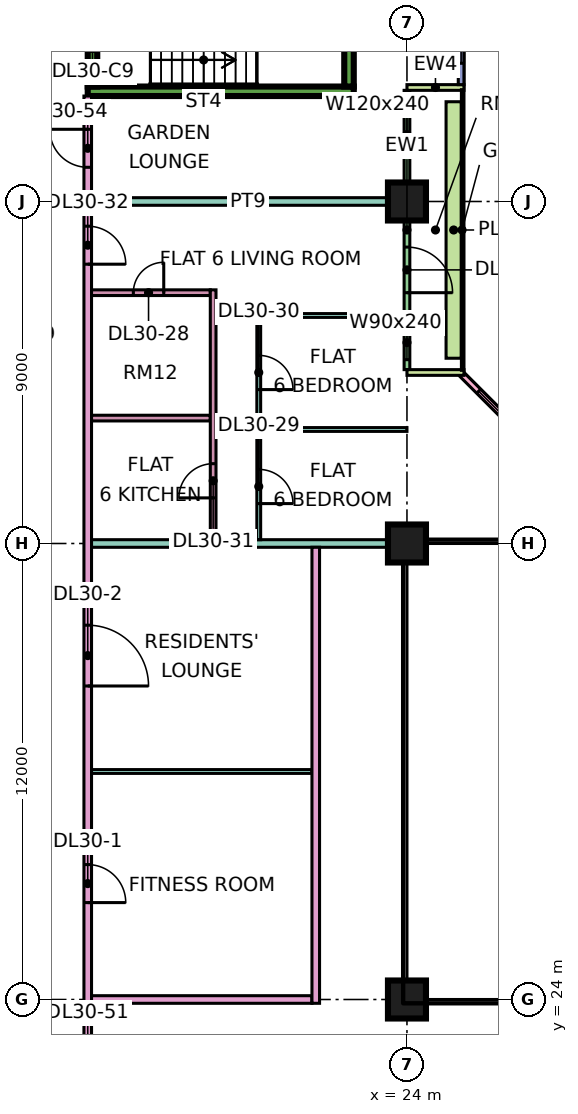
"""IFC4 building model, lengths in metres.
Left out: names, types, materials, properties, quantities, classifications, styles, units other than length and angle.
Written with IfcOpenShell. Run it as: python <this file> out.ifc"""

import sys

from ifc_helpers import new_model, si_unit, direction, frame, frame_2d, origin, origin_2d, place, context, subcontext, project, spatial, rectangle, extrude, element, fill, save


model = new_model("IFC4")
c1 = context("Model", 3, precision=1e-05, world=origin(), true_north=direction((0.0, 1.0)))
c2 = subcontext(c1, "Body", "Model", "MODEL_VIEW")
j1 = project(units=[si_unit("LENGTHUNIT", "METRE"), si_unit("PLANEANGLEUNIT", "RADIAN")], contexts=[c1])
p1 = place(None, origin())
s1 = spatial("IfcSite", under=j1, at=p1, CompositionType="ELEMENT")
p2 = place(p1, origin())
s2 = spatial("IfcBuilding", under=s1, at=p2, CompositionType="ELEMENT")
p3 = place(p2, frame((0.0, 0.0, 129.4)))
s3 = spatial("IfcBuildingStorey", under=s2, at=p3, CompositionType="ELEMENT", Elevation=129.4)
for number, where, z_axis, x_axis in (
    (1, (24.0, 24.0, 0.0), (0.0, 0.0, 1.0), (1.0, 0.0, 0.0)),
    (2, (24.0, 36.0, 0.0), (0.0, 0.0, 1.0), (1.0, 0.0, 0.0)),
    (3, (24.0, 45.0, 0.0), (0.0, 0.0, 1.0), (1.0, 0.0, 0.0)),
):
    element("IfcColumn", number, at=place(p3, frame(where, z_axis=z_axis, x_axis=x_axis)), inside=s3, PredefinedType="COLUMN", context=c2, shape_type="SweptSolid", body=[
        extrude(rectangle(XDim=1.0, YDim=1.0, at=origin_2d()), origin(), (0.0, 0.0, 1.0), 3.75),
    ])
p4 = place(p3, frame((15.6, 47.9, 0.0), z_axis=(0.0, 0.0, 1.0), x_axis=(1.0, 0.0, 0.0)))
e4 = element("IfcWall", 4, at=p4, inside=s3, PredefinedType="SHEAR", context=c2, shape_type="SweptSolid", body=[
    extrude(rectangle(XDim=7.0, YDim=0.25, at=frame_2d((3.5, 0.0))), origin(), (0.0, 0.0, 1.0), 3.75),
])
p5 = place(p3, frame((15.725, 48.025, 0.0), z_axis=(0.0, 0.0, 1.0), x_axis=(0.0, 1.0, 0.0)))
e5 = element("IfcWall", 5, at=p5, inside=s3, PredefinedType="SHEAR", context=c2, shape_type="SweptSolid", body=[
    extrude(rectangle(XDim=2.95, YDim=0.25, at=frame_2d((1.475, 0.0))), origin(), (0.0, 0.0, 1.0), 3.75),
])
p6 = place(p5, frame((0.925, 0.0, 0.0)))
e6 = element("IfcOpeningElement", 6, at=p6, cuts=e5, PredefinedType="OPENING", context=c2, shape_type="SweptSolid", body=[
    extrude(rectangle(XDim=1.1, YDim=2.2, at=frame_2d((0.55, 1.1))), frame((0.0, 0.135, 0.0), z_axis=(0.0, -1.0, 0.0), x_axis=(1.0, 0.0, 0.0)), (0.0, 0.0, 1.0), 0.27),
])
p7 = place(p3, frame((22.475, 48.025, 0.0), z_axis=(0.0, 0.0, 1.0), x_axis=(0.0, 1.0, 0.0)))
e7 = element("IfcWall", 7, at=p7, inside=s3, PredefinedType="SHEAR", context=c2, shape_type="SweptSolid", body=[
    extrude(rectangle(XDim=2.95, YDim=0.25, at=frame_2d((1.475, 0.0))), origin(), (0.0, 0.0, 1.0), 3.75),
])
p8 = place(p3, frame((28.447, 37.447, 0.0), z_axis=(0.0, 0.0, 1.0), x_axis=(-0.707106781187, 0.707106781187, 0.0)))
e8 = element("IfcWall", 8, at=p8, inside=s3, PredefinedType="SOLIDWALL", context=c2, shape_type="SweptSolid", body=[
    extrude(rectangle(XDim=4.243, YDim=0.15, at=frame_2d((2.121, 0.0))), origin(), (0.0, 0.0, 1.0), 3.35),
])
p9 = place(p8, frame((0.621, 0.0, 0.45)))
e9 = element("IfcOpeningElement", 9, at=p9, cuts=e8, PredefinedType="OPENING", context=c2, shape_type="SweptSolid", body=[
    extrude(rectangle(XDim=3.0, YDim=2.4, at=frame_2d((1.5, 1.2))), frame((0.0, 0.085, 0.0), z_axis=(0.0, -1.0, 0.0), x_axis=(1.0, 0.0, 0.0)), (0.0, 0.0, 1.0), 0.17),
])
p10 = place(p3, frame((24.0, 40.575, 0.0), z_axis=(0.0, 0.0, 1.0), x_axis=(0.0, 1.0, 0.0)))
e10 = element("IfcWall", 10, at=p10, inside=s3, PredefinedType="SOLIDWALL", context=c2, shape_type="SweptSolid", body=[
    extrude(rectangle(XDim=7.35, YDim=0.15, at=frame_2d((3.675, 0.0))), origin(), (0.0, 0.0, 1.0), 3.35),
])
p11 = place(p10, frame((0.262, 0.0, 0.45)))
e11 = element("IfcOpeningElement", 11, at=p11, cuts=e10, PredefinedType="OPENING", context=c2, shape_type="SweptSolid", body=[
    extrude(rectangle(XDim=0.9, YDim=2.4, at=frame_2d((0.45, 1.2))), frame((0.0, 0.085, 0.0), z_axis=(0.0, -1.0, 0.0), x_axis=(1.0, 0.0, 0.0)), (0.0, 0.0, 1.0), 0.17),
])
p12 = place(p10, frame((2.025, 0.0, 0.0)))
e12 = element("IfcOpeningElement", 12, at=p12, cuts=e10, PredefinedType="OPENING", context=c2, shape_type="SweptSolid", body=[
    extrude(rectangle(XDim=1.2, YDim=2.4, at=frame_2d((0.6, 1.2))), frame((0.0, 0.085, 0.0), z_axis=(0.0, -1.0, 0.0), x_axis=(1.0, 0.0, 0.0)), (0.0, 0.0, 1.0), 0.17),
])
p13 = place(p10, frame((5.587, 0.0, 0.45)))
e13 = element("IfcOpeningElement", 13, at=p13, cuts=e10, PredefinedType="OPENING", context=c2, shape_type="SweptSolid", body=[
    extrude(rectangle(XDim=1.2, YDim=2.4, at=frame_2d((0.6, 1.2))), frame((0.0, 0.085, 0.0), z_axis=(0.0, -1.0, 0.0), x_axis=(1.0, 0.0, 0.0)), (0.0, 0.0, 1.0), 0.17),
])
for number, where, z_axis, x_axis in (
    (14, (25.5, 40.5, 0.0), (0.0, 0.0, 1.0), (-1.0, 0.0, 0.0)),
    (15, (25.5, 48.0, 0.0), (0.0, 0.0, 1.0), (-1.0, 0.0, 0.0)),
):
    element("IfcWall", number, at=place(p3, frame(where, z_axis=z_axis, x_axis=x_axis)), inside=s3, PredefinedType="SOLIDWALL", context=c2, shape_type="SweptSolid", body=[
        extrude(rectangle(XDim=1.5, YDim=0.15, at=frame_2d((0.75, 0.0))), origin(), (0.0, 0.0, 1.0), 3.35),
    ])
p14 = place(p3, frame((25.425, 48.075, 0.0), z_axis=(0.0, 0.0, 1.0), x_axis=(0.0, 1.0, 0.0)))
e16 = element("IfcWall", 16, at=p14, inside=s3, PredefinedType="SOLIDWALL", context=c2, shape_type="SweptSolid", body=[
    extrude(rectangle(XDim=13.425, YDim=0.15, at=frame_2d((6.712, 0.0))), origin(), (0.0, 0.0, 1.0), 3.35),
])
p15 = place(p14, frame((0.562, 0.0, 0.45)))
e17 = element("IfcOpeningElement", 17, at=p15, cuts=e16, PredefinedType="OPENING", context=c2, shape_type="SweptSolid", body=[
    extrude(rectangle(XDim=4.8, YDim=2.4, at=frame_2d((2.4, 1.2))), frame((0.0, 0.085, 0.0), z_axis=(0.0, -1.0, 0.0), x_axis=(1.0, 0.0, 0.0)), (0.0, 0.0, 1.0), 0.17),
])
p16 = place(p14, frame((6.525, 0.0, 0.45)))
e18 = element("IfcOpeningElement", 18, at=p16, cuts=e16, PredefinedType="OPENING", context=c2, shape_type="SweptSolid", body=[
    extrude(rectangle(XDim=1.8, YDim=2.4, at=frame_2d((0.9, 1.2))), frame((0.0, 0.085, 0.0), z_axis=(0.0, -1.0, 0.0), x_axis=(1.0, 0.0, 0.0)), (0.0, 0.0, 1.0), 0.17),
])
p17 = place(p14, frame((9.525, 0.0, 0.45)))
e19 = element("IfcOpeningElement", 19, at=p17, cuts=e16, PredefinedType="OPENING", context=c2, shape_type="SweptSolid", body=[
    extrude(rectangle(XDim=1.8, YDim=2.4, at=frame_2d((0.9, 1.2))), frame((0.0, 0.085, 0.0), z_axis=(0.0, -1.0, 0.0), x_axis=(1.0, 0.0, 0.0)), (0.0, 0.0, 1.0), 0.17),
])
p18 = place(p14, frame((12.225, 0.0, 0.45)))
e20 = element("IfcOpeningElement", 20, at=p18, cuts=e16, PredefinedType="OPENING", context=c2, shape_type="SweptSolid", body=[
    extrude(rectangle(XDim=0.9, YDim=2.4, at=frame_2d((0.45, 1.2))), frame((0.0, 0.085, 0.0), z_axis=(0.0, -1.0, 0.0), x_axis=(1.0, 0.0, 0.0)), (0.0, 0.0, 1.0), 0.17),
])
p19 = place(p3, frame((25.229, 40.875, 0.0), z_axis=(0.0, 0.0, 1.0), x_axis=(0.0, 1.0, 0.0)))
e21 = element("IfcWall", 21, at=p19, inside=s3, PredefinedType="SOLIDWALL", context=c2, shape_type="SweptSolid", body=[
    extrude(rectangle(XDim=6.75, YDim=0.4, at=frame_2d((3.375, 0.0))), origin(), (0.0, 0.0, 1.0), 0.7),
])
p20 = place(p3, frame((15.6, 20.0, 0.0), z_axis=(0.0, 0.0, 1.0), x_axis=(0.0, 1.0, 0.0)))
e22 = element("IfcWall", 22, at=p20, inside=s3, PredefinedType="PARTITIONING", context=c2, shape_type="SweptSolid", body=[
    extrude(rectangle(XDim=27.775, YDim=0.2, at=frame_2d((13.887, 0.0))), origin(), (0.0, 0.0, 1.0), 3.35),
])
p21 = place(p20, frame((6.55, 0.0, 0.0)))
e23 = element("IfcOpeningElement", 23, at=p21, cuts=e22, PredefinedType="OPENING", context=c2, shape_type="SweptSolid", body=[
    extrude(rectangle(XDim=1.0, YDim=2.1, at=frame_2d((0.5, 1.05))), frame((0.0, 0.11, 0.0), z_axis=(0.0, -1.0, 0.0), x_axis=(1.0, 0.0, 0.0)), (0.0, 0.0, 1.0), 0.22),
])
p22 = place(p20, frame((12.25, 0.0, 0.0)))
e24 = element("IfcOpeningElement", 24, at=p22, cuts=e22, PredefinedType="OPENING", context=c2, shape_type="SweptSolid", body=[
    extrude(rectangle(XDim=1.6, YDim=2.1, at=frame_2d((0.8, 1.05))), frame((0.0, 0.11, 0.0), z_axis=(0.0, -1.0, 0.0), x_axis=(1.0, 0.0, 0.0)), (0.0, 0.0, 1.0), 0.22),
])
p23 = place(p20, frame((23.35, 0.0, 0.0)))
e25 = element("IfcOpeningElement", 25, at=p23, cuts=e22, PredefinedType="OPENING", context=c2, shape_type="SweptSolid", body=[
    extrude(rectangle(XDim=1.0, YDim=2.1, at=frame_2d((0.5, 1.05))), frame((0.0, 0.11, 0.0), z_axis=(0.0, -1.0, 0.0), x_axis=(1.0, 0.0, 0.0)), (0.0, 0.0, 1.0), 0.22),
])
p24 = place(p20, frame((1.15, 0.0, 0.0)))
e26 = element("IfcOpeningElement", 26, at=p24, cuts=e22, PredefinedType="OPENING", context=c2, shape_type="SweptSolid", body=[
    extrude(rectangle(XDim=1.8, YDim=2.1, at=frame_2d((0.9, 1.05))), frame((0.0, 0.11, 0.0), z_axis=(0.0, -1.0, 0.0), x_axis=(1.0, 0.0, 0.0)), (0.0, 0.0, 1.0), 0.22),
])
p25 = place(p20, frame((25.9, 0.0, 0.0)))
e27 = element("IfcOpeningElement", 27, at=p25, cuts=e22, PredefinedType="OPENING", context=c2, shape_type="SweptSolid", body=[
    extrude(rectangle(XDim=1.0, YDim=2.1, at=frame_2d((0.5, 1.05))), frame((0.0, 0.11, 0.0), z_axis=(0.0, -1.0, 0.0), x_axis=(1.0, 0.0, 0.0)), (0.0, 0.0, 1.0), 0.22),
])
p26 = place(p3, frame((15.7, 24.0, 0.0), z_axis=(0.0, 0.0, 1.0), x_axis=(1.0, 0.0, 0.0)))
e28 = element("IfcWall", 28, at=p26, inside=s3, PredefinedType="PARTITIONING", context=c2, shape_type="SweptSolid", body=[
    extrude(rectangle(XDim=5.8, YDim=0.2, at=frame_2d((2.9, 0.0))), origin(), (0.0, 0.0, 1.0), 3.35),
])
p27 = place(p3, frame((15.7, 30.0, 0.0), z_axis=(0.0, 0.0, 1.0), x_axis=(1.0, 0.0, 0.0)))
e29 = element("IfcWall", 29, at=p27, inside=s3, PredefinedType="PARTITIONING", context=c2, shape_type="SweptSolid", body=[
    extrude(rectangle(XDim=5.8, YDim=0.1, at=frame_2d((2.9, 0.0))), origin(), (0.0, 0.0, 1.0), 3.35),
])
p28 = place(p3, frame((15.7, 36.0, 0.0), z_axis=(0.0, 0.0, 1.0), x_axis=(1.0, 0.0, 0.0)))
e30 = element("IfcWall", 30, at=p28, inside=s3, PredefinedType="PARTITIONING", context=c2, shape_type="SweptSolid", body=[
    extrude(rectangle(XDim=8.3, YDim=0.2, at=frame_2d((4.15, 0.0))), origin(), (0.0, 0.0, 1.0), 3.35),
])
p29 = place(p3, frame((15.7, 39.3, 0.0), z_axis=(0.0, 0.0, 1.0), x_axis=(1.0, 0.0, 0.0)))
e31 = element("IfcWall", 31, at=p29, inside=s3, PredefinedType="PARTITIONING", context=c2, shape_type="SweptSolid", body=[
    extrude(rectangle(XDim=3.125, YDim=0.15, at=frame_2d((1.562, 0.0))), origin(), (0.0, 0.0, 1.0), 3.35),
])
p30 = place(p3, frame((15.7, 42.6, 0.0), z_axis=(0.0, 0.0, 1.0), x_axis=(1.0, 0.0, 0.0)))
e32 = element("IfcWall", 32, at=p30, inside=s3, PredefinedType="PARTITIONING", context=c2, shape_type="SweptSolid", body=[
    extrude(rectangle(XDim=3.125, YDim=0.15, at=frame_2d((1.562, 0.0))), origin(), (0.0, 0.0, 1.0), 3.35),
])
p31 = place(p30, frame((1.1, 0.0, 0.0)))
e33 = element("IfcOpeningElement", 33, at=p31, cuts=e32, PredefinedType="OPENING", context=c2, shape_type="SweptSolid", body=[
    extrude(rectangle(XDim=0.8, YDim=2.1, at=frame_2d((0.4, 1.05))), frame((0.0, 0.085, 0.0), z_axis=(0.0, -1.0, 0.0), x_axis=(1.0, 0.0, 0.0)), (0.0, 0.0, 1.0), 0.17),
])
p32 = place(p3, frame((15.7, 45.0, 0.0), z_axis=(0.0, 0.0, 1.0), x_axis=(1.0, 0.0, 0.0)))
e34 = element("IfcWall", 34, at=p32, inside=s3, PredefinedType="PARTITIONING", context=c2, shape_type="SweptSolid", body=[
    extrude(rectangle(XDim=8.226, YDim=0.2, at=frame_2d((4.113, 0.0))), origin(), (0.0, 0.0, 1.0), 3.35),
])
p33 = place(p3, frame((18.9, 36.1, 0.0), z_axis=(0.0, 0.0, 1.0), x_axis=(0.0, 1.0, 0.0)))
e35 = element("IfcWall", 35, at=p33, inside=s3, PredefinedType="PARTITIONING", context=c2, shape_type="SweptSolid", body=[
    extrude(rectangle(XDim=6.575, YDim=0.15, at=frame_2d((3.288, 0.0))), origin(), (0.0, 0.0, 1.0), 3.35),
])
p34 = place(p33, frame((1.1, 0.0, 0.0)))
e36 = element("IfcOpeningElement", 36, at=p34, cuts=e35, PredefinedType="OPENING", context=c2, shape_type="SweptSolid", body=[
    extrude(rectangle(XDim=0.9, YDim=2.1, at=frame_2d((0.45, 1.05))), frame((0.0, 0.085, 0.0), z_axis=(0.0, -1.0, 0.0), x_axis=(1.0, 0.0, 0.0)), (0.0, 0.0, 1.0), 0.17),
])
p35 = place(p3, frame((20.1, 36.1, 0.0), z_axis=(0.0, 0.0, 1.0), x_axis=(0.0, 1.0, 0.0)))
e37 = element("IfcWall", 37, at=p35, inside=s3, PredefinedType="PARTITIONING", context=c2, shape_type="SweptSolid", body=[
    extrude(rectangle(XDim=5.95, YDim=0.1, at=frame_2d((2.975, 0.0))), origin(), (0.0, 0.0, 1.0), 3.35),
])
p36 = place(p35, frame((0.95, 0.0, 0.0)))
e38 = element("IfcOpeningElement", 38, at=p36, cuts=e37, PredefinedType="OPENING", context=c2, shape_type="SweptSolid", body=[
    extrude(rectangle(XDim=0.9, YDim=2.1, at=frame_2d((0.45, 1.05))), frame((0.0, 0.06, 0.0), z_axis=(0.0, -1.0, 0.0), x_axis=(1.0, 0.0, 0.0)), (0.0, 0.0, 1.0), 0.12),
])
p37 = place(p35, frame((3.95, 0.0, 0.0)))
e39 = element("IfcOpeningElement", 39, at=p37, cuts=e37, PredefinedType="OPENING", context=c2, shape_type="SweptSolid", body=[
    extrude(rectangle(XDim=0.9, YDim=2.1, at=frame_2d((0.45, 1.05))), frame((0.0, 0.06, 0.0), z_axis=(0.0, -1.0, 0.0), x_axis=(1.0, 0.0, 0.0)), (0.0, 0.0, 1.0), 0.12),
])
p38 = place(p3, frame((20.15, 39.0, 0.0), z_axis=(0.0, 0.0, 1.0), x_axis=(1.0, 0.0, 0.0)))
e40 = element("IfcWall", 40, at=p38, inside=s3, PredefinedType="PARTITIONING", context=c2, shape_type="SweptSolid", body=[
    extrude(rectangle(XDim=3.85, YDim=0.1, at=frame_2d((1.925, 0.0))), origin(), (0.0, 0.0, 1.0), 3.35),
])
p39 = place(p3, frame((20.15, 42.0, 0.0), z_axis=(0.0, 0.0, 1.0), x_axis=(1.0, 0.0, 0.0)))
e41 = element("IfcWall", 41, at=p39, inside=s3, PredefinedType="PARTITIONING", context=c2, shape_type="SweptSolid", body=[
    extrude(rectangle(XDim=3.776, YDim=0.1, at=frame_2d((1.888, 0.0))), origin(), (0.0, 0.0, 1.0), 3.35),
])
p40 = place(p3, frame((21.6, 23.9, 0.0), z_axis=(0.0, 0.0, 1.0), x_axis=(0.0, 1.0, 0.0)))
e42 = element("IfcWall", 42, at=p40, inside=s3, PredefinedType="PARTITIONING", context=c2, shape_type="SweptSolid", body=[
    extrude(rectangle(XDim=12.0, YDim=0.2, at=frame_2d((6.0, 0.0))), origin(), (0.0, 0.0, 1.0), 3.35),
])
p41 = place(p9, origin())
e43 = element("IfcWindow", 43, at=p41, inside=s3, PartitioningType="SINGLE_PANEL", PredefinedType="WINDOW", context=c2, shape_type="SweptSolid", body=[
    extrude(rectangle(XDim=3.0, YDim=2.4, at=frame_2d((1.5, 1.2))), frame((0.0, 0.03, 0.0), z_axis=(0.0, -1.0, 0.0), x_axis=(1.0, 0.0, 0.0)), (0.0, 0.0, 1.0), 0.06),
])
fill(e9, e43)
p42 = place(p11, origin())
e44 = element("IfcWindow", 44, at=p42, inside=s3, PartitioningType="SINGLE_PANEL", PredefinedType="WINDOW", context=c2, shape_type="SweptSolid", body=[
    extrude(rectangle(XDim=0.9, YDim=2.4, at=frame_2d((0.45, 1.2))), frame((0.0, 0.03, 0.0), z_axis=(0.0, -1.0, 0.0), x_axis=(1.0, 0.0, 0.0)), (0.0, 0.0, 1.0), 0.06),
])
fill(e11, e44)
p43 = place(p12, frame((1.2, 0.0, 0.0), z_axis=(0.0, 0.0, 1.0), x_axis=(-1.0, 0.0, 0.0)))
e45 = element("IfcDoor", 45, at=p43, inside=s3, OperationType="DOUBLE_DOOR_SINGLE_SWING", PredefinedType="DOOR", context=c2, shape_type="SweptSolid", body=[
    extrude(rectangle(XDim=1.2, YDim=2.4, at=frame_2d((0.6, 1.2))), frame((0.0, 0.025, 0.0), z_axis=(0.0, -1.0, 0.0), x_axis=(1.0, 0.0, 0.0)), (0.0, 0.0, 1.0), 0.05),
])
fill(e12, e45)
p44 = place(p13, origin())
e46 = element("IfcWindow", 46, at=p44, inside=s3, PartitioningType="SINGLE_PANEL", PredefinedType="WINDOW", context=c2, shape_type="SweptSolid", body=[
    extrude(rectangle(XDim=1.2, YDim=2.4, at=frame_2d((0.6, 1.2))), frame((0.0, 0.03, 0.0), z_axis=(0.0, -1.0, 0.0), x_axis=(1.0, 0.0, 0.0)), (0.0, 0.0, 1.0), 0.06),
])
fill(e13, e46)
p45 = place(p15, origin())
e47 = element("IfcWindow", 47, at=p45, inside=s3, PartitioningType="SINGLE_PANEL", PredefinedType="WINDOW", context=c2, shape_type="SweptSolid", body=[
    extrude(rectangle(XDim=4.8, YDim=2.4, at=frame_2d((2.4, 1.2))), frame((0.0, 0.03, 0.0), z_axis=(0.0, -1.0, 0.0), x_axis=(1.0, 0.0, 0.0)), (0.0, 0.0, 1.0), 0.06),
])
fill(e17, e47)
p46 = place(p21, frame((1.0, 0.0, 0.0), z_axis=(0.0, 0.0, 1.0), x_axis=(-1.0, 0.0, 0.0)))
e48 = element("IfcDoor", 48, at=p46, inside=s3, OperationType="SINGLE_SWING_LEFT", PredefinedType="DOOR", context=c2, shape_type="SweptSolid", body=[
    extrude(rectangle(XDim=1.0, YDim=2.1, at=frame_2d((0.5, 1.05))), frame((0.0, 0.025, 0.0), z_axis=(0.0, -1.0, 0.0), x_axis=(1.0, 0.0, 0.0)), (0.0, 0.0, 1.0), 0.05),
])
fill(e23, e48)
p47 = place(p22, frame((1.6, 0.0, 0.0), z_axis=(0.0, 0.0, 1.0), x_axis=(-1.0, 0.0, 0.0)))
e49 = element("IfcDoor", 49, at=p47, inside=s3, OperationType="DOUBLE_DOOR_SINGLE_SWING", PredefinedType="DOOR", context=c2, shape_type="SweptSolid", body=[
    extrude(rectangle(XDim=1.6, YDim=2.1, at=frame_2d((0.8, 1.05))), frame((0.0, 0.025, 0.0), z_axis=(0.0, -1.0, 0.0), x_axis=(1.0, 0.0, 0.0)), (0.0, 0.0, 1.0), 0.05),
])
fill(e24, e49)
p48 = place(p31, frame((0.8, 0.0, 0.0), z_axis=(0.0, 0.0, 1.0), x_axis=(-1.0, 0.0, 0.0)))
e50 = element("IfcDoor", 50, at=p48, inside=s3, OperationType="SINGLE_SWING_RIGHT", PredefinedType="DOOR", context=c2, shape_type="SweptSolid", body=[
    extrude(rectangle(XDim=0.8, YDim=2.1, at=frame_2d((0.4, 1.05))), frame((0.0, 0.025, 0.0), z_axis=(0.0, -1.0, 0.0), x_axis=(1.0, 0.0, 0.0)), (0.0, 0.0, 1.0), 0.05),
])
fill(e33, e50)
p49 = place(p36, frame((0.9, 0.0, 0.0), z_axis=(0.0, 0.0, 1.0), x_axis=(-1.0, 0.0, 0.0)))
e51 = element("IfcDoor", 51, at=p49, inside=s3, OperationType="SINGLE_SWING_LEFT", PredefinedType="DOOR", context=c2, shape_type="SweptSolid", body=[
    extrude(rectangle(XDim=0.9, YDim=2.1, at=frame_2d((0.45, 1.05))), frame((0.0, 0.025, 0.0), z_axis=(0.0, -1.0, 0.0), x_axis=(1.0, 0.0, 0.0)), (0.0, 0.0, 1.0), 0.05),
])
fill(e38, e51)
p50 = place(p37, frame((0.9, 0.0, 0.0), z_axis=(0.0, 0.0, 1.0), x_axis=(-1.0, 0.0, 0.0)))
e52 = element("IfcDoor", 52, at=p50, inside=s3, OperationType="SINGLE_SWING_LEFT", PredefinedType="DOOR", context=c2, shape_type="SweptSolid", body=[
    extrude(rectangle(XDim=0.9, YDim=2.1, at=frame_2d((0.45, 1.05))), frame((0.0, 0.025, 0.0), z_axis=(0.0, -1.0, 0.0), x_axis=(1.0, 0.0, 0.0)), (0.0, 0.0, 1.0), 0.05),
])
fill(e39, e52)
p51 = place(p34, origin())
e53 = element("IfcDoor", 53, at=p51, inside=s3, OperationType="SINGLE_SWING_LEFT", PredefinedType="DOOR", context=c2, shape_type="SweptSolid", body=[
    extrude(rectangle(XDim=0.9, YDim=2.1, at=frame_2d((0.45, 1.05))), frame((0.0, 0.025, 0.0), z_axis=(0.0, -1.0, 0.0), x_axis=(1.0, 0.0, 0.0)), (0.0, 0.0, 1.0), 0.05),
])
fill(e36, e53)
p52 = place(p23, frame((1.0, 0.0, 0.0), z_axis=(0.0, 0.0, 1.0), x_axis=(-1.0, 0.0, 0.0)))
e54 = element("IfcDoor", 54, at=p52, inside=s3, OperationType="SINGLE_SWING_LEFT", PredefinedType="DOOR", context=c2, shape_type="SweptSolid", body=[
    extrude(rectangle(XDim=1.0, YDim=2.1, at=frame_2d((0.5, 1.05))), frame((0.0, 0.025, 0.0), z_axis=(0.0, -1.0, 0.0), x_axis=(1.0, 0.0, 0.0)), (0.0, 0.0, 1.0), 0.05),
])
fill(e25, e54)
p53 = place(p25, frame((1.0, 0.0, 0.0), z_axis=(0.0, 0.0, 1.0), x_axis=(-1.0, 0.0, 0.0)))
e55 = element("IfcDoor", 55, at=p53, inside=s3, OperationType="SINGLE_SWING_RIGHT", PredefinedType="DOOR", context=c2, shape_type="SweptSolid", body=[
    extrude(rectangle(XDim=1.0, YDim=2.1, at=frame_2d((0.5, 1.05))), frame((0.0, 0.025, 0.0), z_axis=(0.0, -1.0, 0.0), x_axis=(1.0, 0.0, 0.0)), (0.0, 0.0, 1.0), 0.05),
])
fill(e27, e55)
save(model, sys.argv[1])
